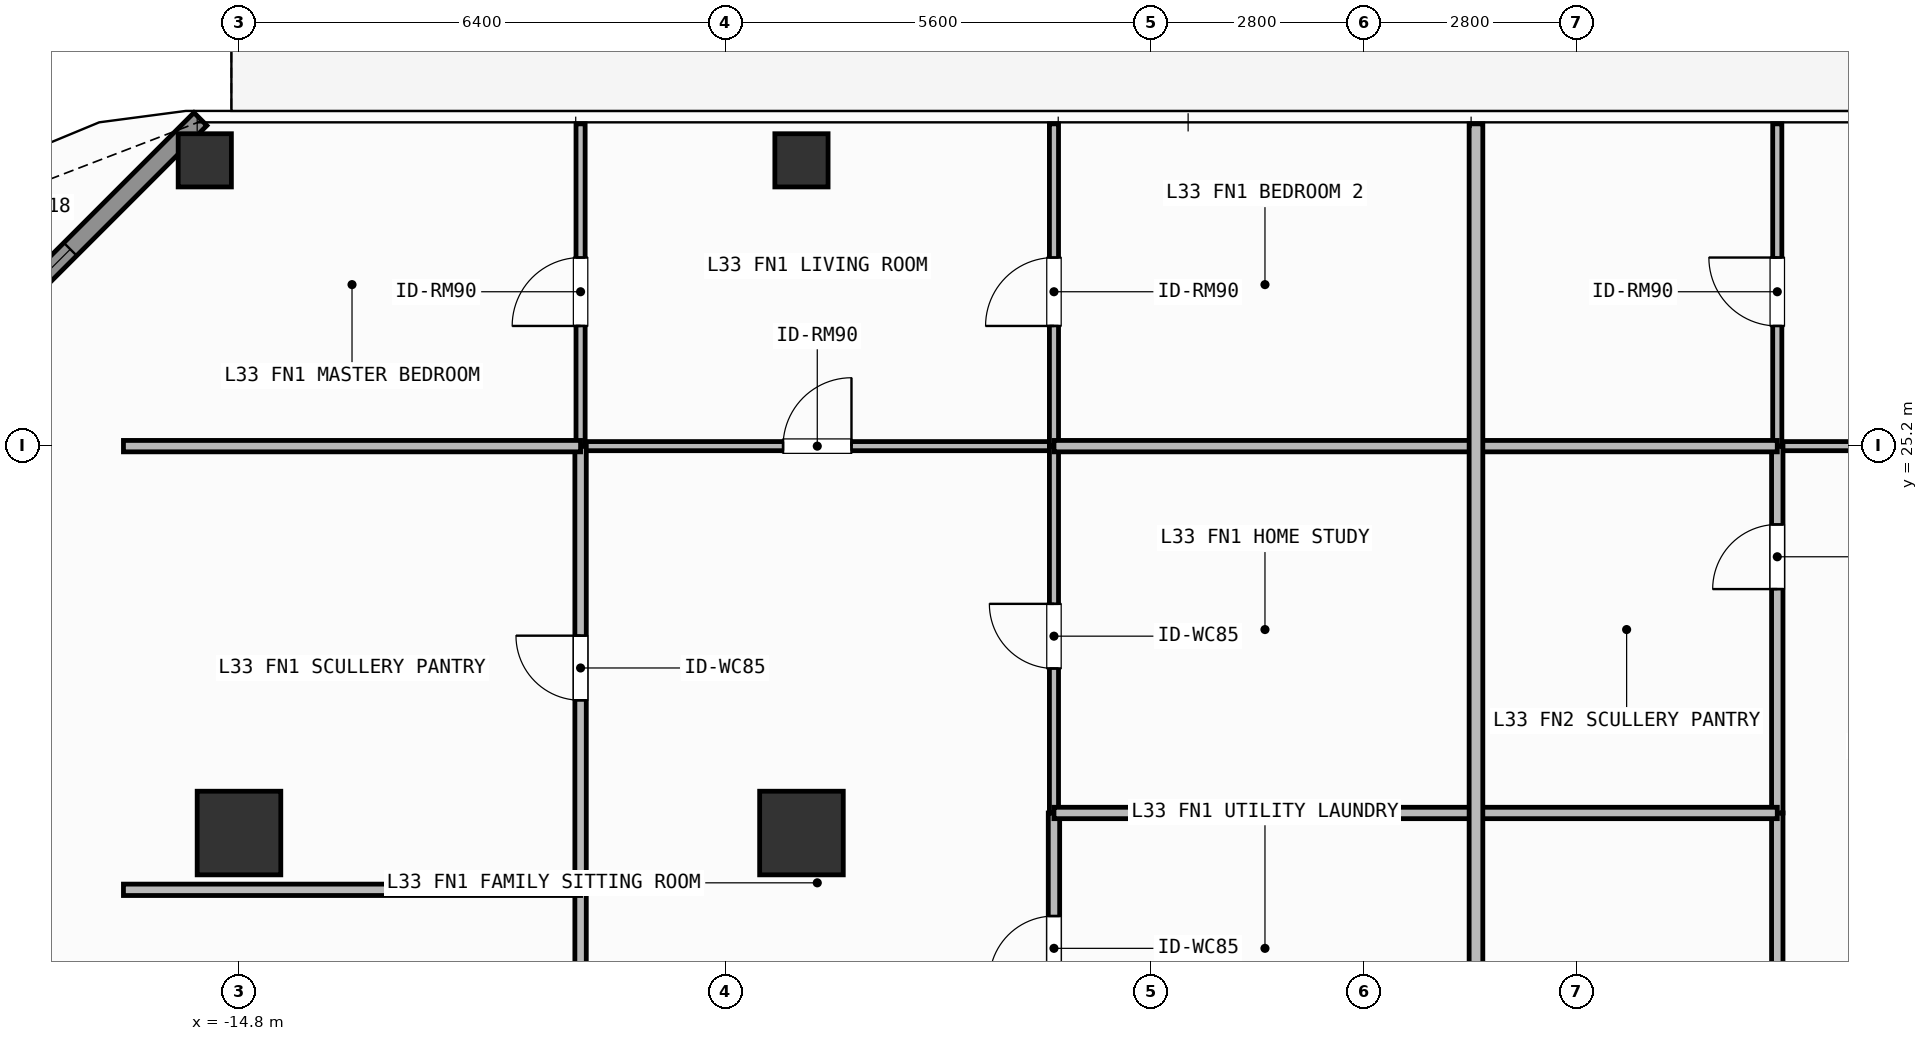
"""IFC4 building model, lengths in metres.
Left out: names, types, materials, properties, quantities, classifications, styles, units other than length and angle.
Written with IfcOpenShell. Run it as: python <this file> out.ifc"""

import sys

from ifc_helpers import new_model, si_unit, direction, frame, frame_2d, origin, origin_2d, place, context, subcontext, project, spatial, rectangle, hollow_rectangle, extrude, element, fill, save


model = new_model("IFC4")
c1 = context("Model", 3, precision=1e-05, world=origin(), true_north=direction((0.0, 1.0)))
c2 = subcontext(c1, "Body", "Model", "MODEL_VIEW")
j1 = project(units=[si_unit("LENGTHUNIT", "METRE"), si_unit("PLANEANGLEUNIT", "RADIAN")], contexts=[c1])
p1 = place(None, origin())
s1 = spatial("IfcSite", under=j1, at=p1, CompositionType="ELEMENT")
p2 = place(p1, origin())
s2 = spatial("IfcBuilding", under=s1, at=p2, CompositionType="ELEMENT")
p3 = place(p2, frame((0.0, 0.0, 132.9)))
s3 = spatial("IfcBuildingStorey", under=s2, at=p3, CompositionType="ELEMENT", Elevation=132.9)
for number, where, z_axis, x_axis in (
    (1, (-14.8, 20.1, 0.0), (0.0, 0.0, 1.0), (1.0, 0.0, 0.0)),
    (2, (-7.4, 20.1, 0.0), (0.0, 0.0, 1.0), (1.0, 0.0, 0.0)),
):
    element("IfcColumn", number, at=place(p3, frame(where, z_axis=z_axis, x_axis=x_axis)), inside=s3, PredefinedType="COLUMN", context=c2, shape_type="SweptSolid", body=[
        extrude(rectangle(XDim=1.1, YDim=1.1, at=origin_2d()), origin(), (0.0, 0.0, 1.0), 3.9),
    ])
for number, where, z_axis, x_axis in (
    (3, (-15.25, 28.95, 0.0), (0.0, 0.0, 1.0), (1.0, 0.0, 0.0)),
    (4, (-7.4, 28.95, 0.0), (0.0, 0.0, 1.0), (1.0, 0.0, 0.0)),
):
    element("IfcColumn", number, at=place(p3, frame(where, z_axis=z_axis, x_axis=x_axis)), inside=s3, PredefinedType="COLUMN", context=c2, shape_type="SweptSolid", body=[
        extrude(hollow_rectangle(XDim=0.7, YDim=0.7, WallThickness=0.032, at=origin_2d()), origin(), (0.0, 0.0, 1.0), 3.9),
    ])
p4 = place(p3, frame((-19.792, 25.008, 0.0), z_axis=(0.0, 0.0, 1.0), x_axis=(0.707106781187, 0.707106781187, 0.0)))
e5 = element("IfcWall", 5, at=p4, inside=s3, PredefinedType="SOLIDWALL", context=c2, shape_type="SweptSolid", body=[
    extrude(rectangle(XDim=6.343, YDim=0.24, at=frame_2d((3.171, 0.0))), origin(), (0.0, 0.0, 1.0), 3.62),
])
p5 = place(p4, frame((2.421, 0.0, 0.8)))
e6 = element("IfcOpeningElement", 6, at=p5, cuts=e5, PredefinedType="OPENING", context=c2, shape_type="SweptSolid", body=[
    extrude(rectangle(XDim=1.5, YDim=1.85, at=frame_2d((0.75, 0.925))), frame((0.0, 0.13, 0.0), z_axis=(0.0, -1.0, 0.0), x_axis=(1.0, 0.0, 0.0)), (0.0, 0.0, 1.0), 0.26),
])
p6 = place(p3, frame((-10.306, 25.19, 0.0), z_axis=(0.0, 0.0, 1.0), x_axis=(1.0, 0.0, 0.0)))
e7 = element("IfcWall", 7, at=p6, inside=s3, PredefinedType="PARTITIONING", context=c2, shape_type="SweptSolid", body=[
    extrude(rectangle(XDim=6.228, YDim=0.12, at=frame_2d((3.114, 0.0))), origin(), (0.0, 0.0, 1.0), 3.62),
])
p7 = place(p6, frame((2.664, 0.0, 0.0)))
e8 = element("IfcOpeningElement", 8, at=p7, cuts=e7, PredefinedType="OPENING", context=c2, shape_type="SweptSolid", body=[
    extrude(rectangle(XDim=0.9, YDim=2.1, at=frame_2d((0.45, 1.05))), frame((0.0, 0.07, 0.0), z_axis=(0.0, -1.0, 0.0), x_axis=(1.0, 0.0, 0.0)), (0.0, 0.0, 1.0), 0.14),
])
p8 = place(p3, frame((-10.306, 13.7, 0.0), z_axis=(0.0, 0.0, 1.0), x_axis=(0.0, 1.0, 0.0)))
e9 = element("IfcWall", 9, at=p8, inside=s3, PredefinedType="PARTITIONING", context=c2, shape_type="SweptSolid", body=[
    extrude(rectangle(XDim=5.653, YDim=0.15, at=frame_2d((2.827, 0.0))), origin(), (0.0, 0.0, 1.0), 3.62),
])
p9 = place(p8, frame((2.312, 0.0, 0.0)))
e10 = element("IfcOpeningElement", 10, at=p9, cuts=e9, PredefinedType="OPENING", context=c2, shape_type="SweptSolid", body=[
    extrude(rectangle(XDim=0.85, YDim=2.1, at=frame_2d((0.425, 1.05))), frame((0.0, 0.085, 0.0), z_axis=(0.0, -1.0, 0.0), x_axis=(1.0, 0.0, 0.0)), (0.0, 0.0, 1.0), 0.17),
])
p10 = place(p3, frame((-10.306, 19.353, 0.0), z_axis=(0.0, 0.0, 1.0), x_axis=(0.0, 1.0, 0.0)))
e11 = element("IfcWall", 11, at=p10, inside=s3, PredefinedType="PARTITIONING", context=c2, shape_type="SweptSolid", body=[
    extrude(rectangle(XDim=5.837, YDim=0.15, at=frame_2d((2.918, 0.0))), origin(), (0.0, 0.0, 1.0), 3.62),
])
p11 = place(p10, frame((2.493, 0.0, 0.0)))
e12 = element("IfcOpeningElement", 12, at=p11, cuts=e11, PredefinedType="OPENING", context=c2, shape_type="SweptSolid", body=[
    extrude(rectangle(XDim=0.85, YDim=2.1, at=frame_2d((0.425, 1.05))), frame((0.0, 0.085, 0.0), z_axis=(0.0, -1.0, 0.0), x_axis=(1.0, 0.0, 0.0)), (0.0, 0.0, 1.0), 0.17),
])
p12 = place(p3, frame((-10.306, 25.19, 0.0), z_axis=(0.0, 0.0, 1.0), x_axis=(0.0, 1.0, 0.0)))
e13 = element("IfcWall", 13, at=p12, inside=s3, PredefinedType="PARTITIONING", context=c2, shape_type="SweptSolid", body=[
    extrude(rectangle(XDim=4.24, YDim=0.12, at=frame_2d((2.12, 0.0))), origin(), (0.0, 0.0, 1.0), 3.62),
])
p13 = place(p12, frame((1.581, 0.0, 0.0)))
e14 = element("IfcOpeningElement", 14, at=p13, cuts=e13, PredefinedType="OPENING", context=c2, shape_type="SweptSolid", body=[
    extrude(rectangle(XDim=0.9, YDim=2.1, at=frame_2d((0.45, 1.05))), frame((0.0, 0.07, 0.0), z_axis=(0.0, -1.0, 0.0), x_axis=(1.0, 0.0, 0.0)), (0.0, 0.0, 1.0), 0.14),
])
p14 = place(p3, frame((-4.078, 16.802, 0.0), z_axis=(0.0, 0.0, 1.0), x_axis=(0.0, 1.0, 0.0)))
e15 = element("IfcWall", 15, at=p14, inside=s3, PredefinedType="PARTITIONING", context=c2, shape_type="SweptSolid", body=[
    extrude(rectangle(XDim=3.562, YDim=0.15, at=frame_2d((1.781, 0.0))), origin(), (0.0, 0.0, 1.0), 3.62),
])
p15 = place(p14, frame((1.356, 0.0, 0.0)))
e16 = element("IfcOpeningElement", 16, at=p15, cuts=e15, PredefinedType="OPENING", context=c2, shape_type="SweptSolid", body=[
    extrude(rectangle(XDim=0.85, YDim=2.1, at=frame_2d((0.425, 1.05))), frame((0.0, 0.085, 0.0), z_axis=(0.0, -1.0, 0.0), x_axis=(1.0, 0.0, 0.0)), (0.0, 0.0, 1.0), 0.17),
])
p16 = place(p3, frame((-4.078, 20.364, 0.0), z_axis=(0.0, 0.0, 1.0), x_axis=(0.0, 1.0, 0.0)))
e17 = element("IfcWall", 17, at=p16, inside=s3, PredefinedType="PARTITIONING", context=c2, shape_type="SweptSolid", body=[
    extrude(rectangle(XDim=4.826, YDim=0.12, at=frame_2d((2.413, 0.0))), origin(), (0.0, 0.0, 1.0), 3.62),
])
p17 = place(p16, frame((1.901, 0.0, 0.0)))
e18 = element("IfcOpeningElement", 18, at=p17, cuts=e17, PredefinedType="OPENING", context=c2, shape_type="SweptSolid", body=[
    extrude(rectangle(XDim=0.85, YDim=2.1, at=frame_2d((0.425, 1.05))), frame((0.0, 0.07, 0.0), z_axis=(0.0, -1.0, 0.0), x_axis=(1.0, 0.0, 0.0)), (0.0, 0.0, 1.0), 0.14),
])
p18 = place(p3, frame((-4.078, 25.19, 0.0), z_axis=(0.0, 0.0, 1.0), x_axis=(0.0, 1.0, 0.0)))
e19 = element("IfcWall", 19, at=p18, inside=s3, PredefinedType="PARTITIONING", context=c2, shape_type="SweptSolid", body=[
    extrude(rectangle(XDim=4.24, YDim=0.12, at=frame_2d((2.12, 0.0))), origin(), (0.0, 0.0, 1.0), 3.62),
])
p19 = place(p18, frame((1.581, 0.0, 0.0)))
e20 = element("IfcOpeningElement", 20, at=p19, cuts=e19, PredefinedType="OPENING", context=c2, shape_type="SweptSolid", body=[
    extrude(rectangle(XDim=0.9, YDim=2.1, at=frame_2d((0.45, 1.05))), frame((0.0, 0.07, 0.0), z_axis=(0.0, -1.0, 0.0), x_axis=(1.0, 0.0, 0.0)), (0.0, 0.0, 1.0), 0.14),
])
p20 = place(p3, frame((5.438, 25.19, 0.0), z_axis=(0.0, 0.0, 1.0), x_axis=(1.0, 0.0, 0.0)))
e21 = element("IfcWall", 21, at=p20, inside=s3, PredefinedType="PARTITIONING", context=c2, shape_type="SweptSolid", body=[
    extrude(rectangle(XDim=6.006, YDim=0.12, at=frame_2d((3.003, 0.0))), origin(), (0.0, 0.0, 1.0), 3.62),
])
p21 = place(p20, frame((2.642, 0.0, 0.0)))
e22 = element("IfcOpeningElement", 22, at=p21, cuts=e21, PredefinedType="OPENING", context=c2, shape_type="SweptSolid", body=[
    extrude(rectangle(XDim=0.9, YDim=2.1, at=frame_2d((0.45, 1.05))), frame((0.0, 0.07, 0.0), z_axis=(0.0, -1.0, 0.0), x_axis=(1.0, 0.0, 0.0)), (0.0, 0.0, 1.0), 0.14),
])
p22 = place(p3, frame((5.438, 13.7, 0.0), z_axis=(0.0, 0.0, 1.0), x_axis=(0.0, 1.0, 0.0)))
e23 = element("IfcWall", 23, at=p22, inside=s3, PredefinedType="PARTITIONING", context=c2, shape_type="SweptSolid", body=[
    extrude(rectangle(XDim=6.664, YDim=0.15, at=frame_2d((3.332, 0.0))), origin(), (0.0, 0.0, 1.0), 3.62),
])
p23 = place(p22, frame((2.818, 0.0, 0.0)))
e24 = element("IfcOpeningElement", 24, at=p23, cuts=e23, PredefinedType="OPENING", context=c2, shape_type="SweptSolid", body=[
    extrude(rectangle(XDim=0.85, YDim=2.1, at=frame_2d((0.425, 1.05))), frame((0.0, 0.085, 0.0), z_axis=(0.0, -1.0, 0.0), x_axis=(1.0, 0.0, 0.0)), (0.0, 0.0, 1.0), 0.17),
])
p24 = place(p3, frame((5.438, 20.364, 0.0), z_axis=(0.0, 0.0, 1.0), x_axis=(0.0, 1.0, 0.0)))
e25 = element("IfcWall", 25, at=p24, inside=s3, PredefinedType="PARTITIONING", context=c2, shape_type="SweptSolid", body=[
    extrude(rectangle(XDim=4.826, YDim=0.15, at=frame_2d((2.413, 0.0))), origin(), (0.0, 0.0, 1.0), 3.62),
])
p25 = place(p24, frame((2.946, 0.0, 0.0)))
e26 = element("IfcOpeningElement", 26, at=p25, cuts=e25, PredefinedType="OPENING", context=c2, shape_type="SweptSolid", body=[
    extrude(rectangle(XDim=0.85, YDim=2.1, at=frame_2d((0.425, 1.05))), frame((0.0, 0.085, 0.0), z_axis=(0.0, -1.0, 0.0), x_axis=(1.0, 0.0, 0.0)), (0.0, 0.0, 1.0), 0.17),
])
p26 = place(p3, frame((5.438, 25.19, 0.0), z_axis=(0.0, 0.0, 1.0), x_axis=(0.0, 1.0, 0.0)))
e27 = element("IfcWall", 27, at=p26, inside=s3, PredefinedType="PARTITIONING", context=c2, shape_type="SweptSolid", body=[
    extrude(rectangle(XDim=4.24, YDim=0.12, at=frame_2d((2.12, 0.0))), origin(), (0.0, 0.0, 1.0), 3.62),
])
p27 = place(p26, frame((1.581, 0.0, 0.0)))
e28 = element("IfcOpeningElement", 28, at=p27, cuts=e27, PredefinedType="OPENING", context=c2, shape_type="SweptSolid", body=[
    extrude(rectangle(XDim=0.9, YDim=2.1, at=frame_2d((0.45, 1.05))), frame((0.0, 0.07, 0.0), z_axis=(0.0, -1.0, 0.0), x_axis=(1.0, 0.0, 0.0)), (0.0, 0.0, 1.0), 0.14),
])
p28 = place(p3, frame((-16.32, 19.353, 0.0), z_axis=(0.0, 0.0, 1.0), x_axis=(1.0, 0.0, 0.0)))
e29 = element("IfcWall", 29, at=p28, inside=s3, PredefinedType="PARTITIONING", context=c2, shape_type="SweptSolid", body=[
    extrude(rectangle(XDim=6.014, YDim=0.15, at=frame_2d((3.007, 0.0))), origin(), (0.0, 0.0, 1.0), 3.31),
])
p29 = place(p3, frame((-16.32, 25.19, 0.0), z_axis=(0.0, 0.0, 1.0), x_axis=(1.0, 0.0, 0.0)))
e30 = element("IfcWall", 30, at=p29, inside=s3, PredefinedType="PARTITIONING", context=c2, shape_type="SweptSolid", body=[
    extrude(rectangle(XDim=6.014, YDim=0.15, at=frame_2d((3.007, 0.0))), origin(), (0.0, 0.0, 1.0), 3.62),
])
p30 = place(p3, frame((-4.078, 20.364, 0.0), z_axis=(0.0, 0.0, 1.0), x_axis=(1.0, 0.0, 0.0)))
e31 = element("IfcWall", 31, at=p30, inside=s3, PredefinedType="PARTITIONING", context=c2, shape_type="SweptSolid", body=[
    extrude(rectangle(XDim=5.552, YDim=0.15, at=frame_2d((2.776, 0.0))), origin(), (0.0, 0.0, 1.0), 2.71),
])
p31 = place(p3, frame((-4.078, 25.19, 0.0), z_axis=(0.0, 0.0, 1.0), x_axis=(1.0, 0.0, 0.0)))
e32 = element("IfcWall", 32, at=p31, inside=s3, PredefinedType="PARTITIONING", context=c2, shape_type="SweptSolid", body=[
    extrude(rectangle(XDim=5.552, YDim=0.15, at=frame_2d((2.776, 0.0))), origin(), (0.0, 0.0, 1.0), 3.62),
])
p32 = place(p3, frame((1.474, 20.364, 0.0), z_axis=(0.0, 0.0, 1.0), x_axis=(1.0, 0.0, 0.0)))
e33 = element("IfcWall", 33, at=p32, inside=s3, PredefinedType="PARTITIONING", context=c2, shape_type="SweptSolid", body=[
    extrude(rectangle(XDim=3.964, YDim=0.15, at=frame_2d((1.982, 0.0))), origin(), (0.0, 0.0, 1.0), 2.71),
])
p33 = place(p3, frame((1.474, 25.19, 0.0), z_axis=(0.0, 0.0, 1.0), x_axis=(1.0, 0.0, 0.0)))
e34 = element("IfcWall", 34, at=p33, inside=s3, PredefinedType="PARTITIONING", context=c2, shape_type="SweptSolid", body=[
    extrude(rectangle(XDim=3.964, YDim=0.15, at=frame_2d((1.982, 0.0))), origin(), (0.0, 0.0, 1.0), 3.62),
])
p34 = place(p3, frame((1.474, 13.7, 0.0), z_axis=(0.0, 0.0, 1.0), x_axis=(0.0, 1.0, 0.0)))
e35 = element("IfcWall", 35, at=p34, inside=s3, PredefinedType="PARTITIONING", context=c2, shape_type="SweptSolid", body=[
    extrude(rectangle(XDim=15.73, YDim=0.18, at=frame_2d((7.865, 0.0))), origin(), (0.0, 0.0, 1.0), 3.62),
])
p35 = place(p5, origin())
e36 = element("IfcWindow", 36, at=p35, inside=s3, PartitioningType="SINGLE_PANEL", PredefinedType="WINDOW", context=c2, shape_type="SweptSolid", body=[
    extrude(rectangle(XDim=1.5, YDim=1.85, at=frame_2d((0.75, 0.925))), frame((0.0, 0.03, 0.0), z_axis=(0.0, -1.0, 0.0), x_axis=(1.0, 0.0, 0.0)), (0.0, 0.0, 1.0), 0.06),
])
fill(e6, e36)
p36 = place(p7, origin())
e37 = element("IfcDoor", 37, at=p36, inside=s3, OperationType="SINGLE_SWING_RIGHT", PredefinedType="DOOR", context=c2, shape_type="SweptSolid", body=[
    extrude(rectangle(XDim=0.9, YDim=2.1, at=frame_2d((0.45, 1.05))), frame((0.0, 0.025, 0.0), z_axis=(0.0, -1.0, 0.0), x_axis=(1.0, 0.0, 0.0)), (0.0, 0.0, 1.0), 0.05),
])
fill(e8, e37)
p37 = place(p11, origin())
e38 = element("IfcDoor", 38, at=p37, inside=s3, OperationType="SINGLE_SWING_RIGHT", PredefinedType="DOOR", context=c2, shape_type="SweptSolid", body=[
    extrude(rectangle(XDim=0.85, YDim=2.1, at=frame_2d((0.425, 1.05))), frame((0.0, 0.025, 0.0), z_axis=(0.0, -1.0, 0.0), x_axis=(1.0, 0.0, 0.0)), (0.0, 0.0, 1.0), 0.05),
])
fill(e12, e38)
p38 = place(p13, origin())
e39 = element("IfcDoor", 39, at=p38, inside=s3, OperationType="SINGLE_SWING_LEFT", PredefinedType="DOOR", context=c2, shape_type="SweptSolid", body=[
    extrude(rectangle(XDim=0.9, YDim=2.1, at=frame_2d((0.45, 1.05))), frame((0.0, 0.025, 0.0), z_axis=(0.0, -1.0, 0.0), x_axis=(1.0, 0.0, 0.0)), (0.0, 0.0, 1.0), 0.05),
])
fill(e14, e39)
p39 = place(p15, origin())
e40 = element("IfcDoor", 40, at=p39, inside=s3, OperationType="SINGLE_SWING_LEFT", PredefinedType="DOOR", context=c2, shape_type="SweptSolid", body=[
    extrude(rectangle(XDim=0.85, YDim=2.1, at=frame_2d((0.425, 1.05))), frame((0.0, 0.025, 0.0), z_axis=(0.0, -1.0, 0.0), x_axis=(1.0, 0.0, 0.0)), (0.0, 0.0, 1.0), 0.05),
])
fill(e16, e40)
p40 = place(p17, origin())
e41 = element("IfcDoor", 41, at=p40, inside=s3, OperationType="SINGLE_SWING_RIGHT", PredefinedType="DOOR", context=c2, shape_type="SweptSolid", body=[
    extrude(rectangle(XDim=0.85, YDim=2.1, at=frame_2d((0.425, 1.05))), frame((0.0, 0.025, 0.0), z_axis=(0.0, -1.0, 0.0), x_axis=(1.0, 0.0, 0.0)), (0.0, 0.0, 1.0), 0.05),
])
fill(e18, e41)
p41 = place(p19, origin())
e42 = element("IfcDoor", 42, at=p41, inside=s3, OperationType="SINGLE_SWING_LEFT", PredefinedType="DOOR", context=c2, shape_type="SweptSolid", body=[
    extrude(rectangle(XDim=0.9, YDim=2.1, at=frame_2d((0.45, 1.05))), frame((0.0, 0.025, 0.0), z_axis=(0.0, -1.0, 0.0), x_axis=(1.0, 0.0, 0.0)), (0.0, 0.0, 1.0), 0.05),
])
fill(e20, e42)
p42 = place(p25, origin())
e43 = element("IfcDoor", 43, at=p42, inside=s3, OperationType="SINGLE_SWING_LEFT", PredefinedType="DOOR", context=c2, shape_type="SweptSolid", body=[
    extrude(rectangle(XDim=0.85, YDim=2.1, at=frame_2d((0.425, 1.05))), frame((0.0, 0.025, 0.0), z_axis=(0.0, -1.0, 0.0), x_axis=(1.0, 0.0, 0.0)), (0.0, 0.0, 1.0), 0.05),
])
fill(e26, e43)
p43 = place(p27, origin())
e44 = element("IfcDoor", 44, at=p43, inside=s3, OperationType="SINGLE_SWING_RIGHT", PredefinedType="DOOR", context=c2, shape_type="SweptSolid", body=[
    extrude(rectangle(XDim=0.9, YDim=2.1, at=frame_2d((0.45, 1.05))), frame((0.0, 0.025, 0.0), z_axis=(0.0, -1.0, 0.0), x_axis=(1.0, 0.0, 0.0)), (0.0, 0.0, 1.0), 0.05),
])
fill(e28, e44)
save(model, sys.argv[1])
